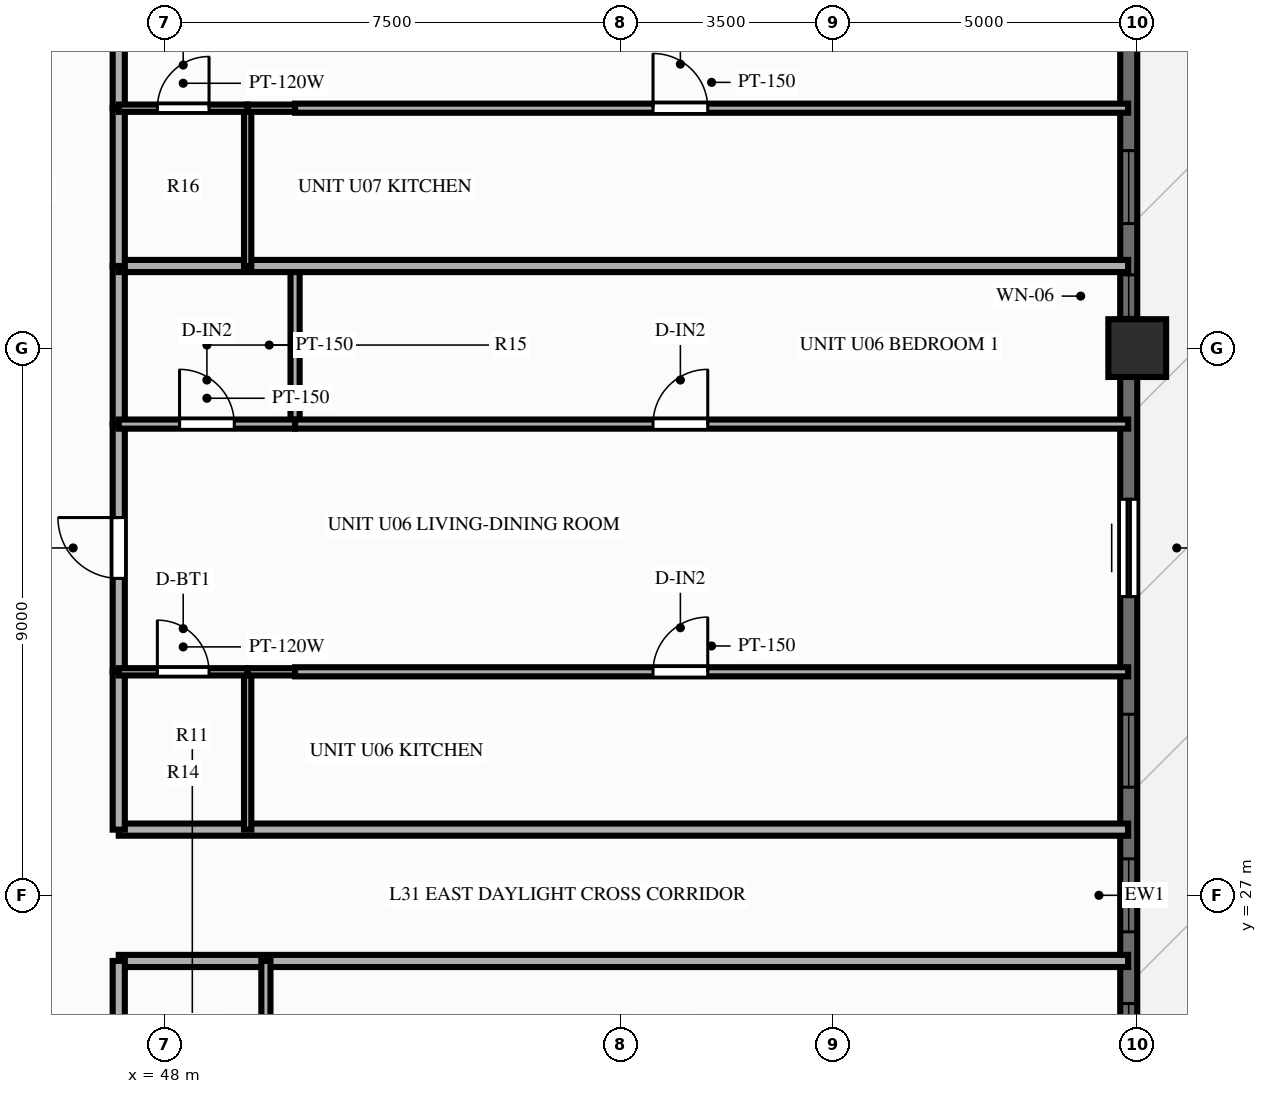
"""IFC4 building model, lengths in metres.
Left out: names, types, materials, properties, quantities, classifications, styles, units other than length and angle.
Written with IfcOpenShell. Run it as: python <this file> out.ifc"""

import sys

from ifc_helpers import new_model, si_unit, direction, frame, frame_2d, origin, origin_2d, place, context, subcontext, project, spatial, rectangle, extrude, source, transform, mapped, element, fill, save


model = new_model("IFC4")
c1 = context("Model", 3, precision=1e-05, world=origin(), true_north=direction((0.0, 1.0)))
c2 = subcontext(c1, "Body", "Model", "MODEL_VIEW")
j1 = project(units=[si_unit("LENGTHUNIT", "METRE"), si_unit("PLANEANGLEUNIT", "RADIAN")], contexts=[c1])
p1 = place(None, origin())
s1 = spatial("IfcSite", under=j1, at=p1, CompositionType="ELEMENT")
p2 = place(p1, origin())
s2 = spatial("IfcBuilding", under=s1, at=p2, CompositionType="ELEMENT")
p3 = place(p2, frame((0.0, 0.0, 98.85)))
s3 = spatial("IfcBuildingStorey", under=s2, at=p3, CompositionType="ELEMENT", Elevation=98.85)
m1 = source(origin(), c2, "Body", "SweptSolid", [
    extrude(rectangle(XDim=0.95, YDim=0.95, at=origin_2d()), origin(), (0.0, 0.0, 1.0), 3.0),
])
p4 = place(p3, frame((64.0, 36.0, 0.0), z_axis=(0.0, 0.0, 1.0), x_axis=(1.0, 0.0, 0.0)))
e1 = element("IfcColumn", 1, at=p4, inside=s3, PredefinedType="COLUMN", context=c2, shape_type="MappedRepresentation", body=[
    mapped(m1, transform((0.0, 0.0, 0.0), scale=1.0)),
])
p5 = place(p3, frame((63.86, 7.2, 0.0), z_axis=(0.0, 0.0, 1.0), x_axis=(0.0, 1.0, 0.0)))
e2 = element("IfcWall", 2, at=p5, inside=s3, PredefinedType="SOLIDWALL", context=c2, shape_type="SweptSolid", body=[
    extrude(rectangle(XDim=39.6, YDim=0.28, at=frame_2d((19.8, 0.0))), origin(), (0.0, 0.0, 1.0), 2.28),
])
p6 = place(p5, frame((0.945, 0.0, 0.25)))
e3 = element("IfcOpeningElement", 3, at=p6, cuts=e2, PredefinedType="OPENING", context=c2, shape_type="SweptSolid", body=[
    extrude(rectangle(XDim=1.2, YDim=1.5, at=frame_2d((0.6, 0.75))), frame((0.0, 0.152, 0.0), z_axis=(0.0, -1.0, 0.0), x_axis=(1.0, 0.0, 0.0)), (0.0, 0.0, 1.0), 0.304),
])
p7 = place(p5, frame((4.213, 0.0, 0.25)))
e4 = element("IfcOpeningElement", 4, at=p7, cuts=e2, PredefinedType="OPENING", context=c2, shape_type="SweptSolid", body=[
    extrude(rectangle(XDim=1.2, YDim=1.5, at=frame_2d((0.6, 0.75))), frame((0.0, 0.152, 0.0), z_axis=(0.0, -1.0, 0.0), x_axis=(1.0, 0.0, 0.0)), (0.0, 0.0, 1.0), 0.304),
])
p8 = place(p5, frame((7.55, 0.0, 0.25)))
e5 = element("IfcOpeningElement", 5, at=p8, cuts=e2, PredefinedType="OPENING", context=c2, shape_type="SweptSolid", body=[
    extrude(rectangle(XDim=1.2, YDim=1.5, at=frame_2d((0.6, 0.75))), frame((0.0, 0.152, 0.0), z_axis=(0.0, -1.0, 0.0), x_axis=(1.0, 0.0, 0.0)), (0.0, 0.0, 1.0), 0.304),
])
p9 = place(p5, frame((13.483, 0.0, 0.25)))
e6 = element("IfcOpeningElement", 6, at=p9, cuts=e2, PredefinedType="OPENING", context=c2, shape_type="SweptSolid", body=[
    extrude(rectangle(XDim=1.2, YDim=1.5, at=frame_2d((0.6, 0.75))), frame((0.0, 0.152, 0.0), z_axis=(0.0, -1.0, 0.0), x_axis=(1.0, 0.0, 0.0)), (0.0, 0.0, 1.0), 0.304),
])
p10 = place(p5, frame((16.82, 0.0, 0.25)))
e7 = element("IfcOpeningElement", 7, at=p10, cuts=e2, PredefinedType="OPENING", context=c2, shape_type="SweptSolid", body=[
    extrude(rectangle(XDim=1.2, YDim=1.5, at=frame_2d((0.6, 0.75))), frame((0.0, 0.152, 0.0), z_axis=(0.0, -1.0, 0.0), x_axis=(1.0, 0.0, 0.0)), (0.0, 0.0, 1.0), 0.304),
])
p11 = place(p5, frame((19.2, 0.0, 0.25)))
e8 = element("IfcOpeningElement", 8, at=p11, cuts=e2, PredefinedType="OPENING", context=c2, shape_type="SweptSolid", body=[
    extrude(rectangle(XDim=1.2, YDim=1.5, at=frame_2d((0.6, 0.75))), frame((0.0, 0.152, 0.0), z_axis=(0.0, -1.0, 0.0), x_axis=(1.0, 0.0, 0.0)), (0.0, 0.0, 1.0), 0.304),
])
p12 = place(p5, frame((21.578, 0.0, 0.25)))
e9 = element("IfcOpeningElement", 9, at=p12, cuts=e2, PredefinedType="OPENING", context=c2, shape_type="SweptSolid", body=[
    extrude(rectangle(XDim=1.2, YDim=1.5, at=frame_2d((0.6, 0.75))), frame((0.0, 0.152, 0.0), z_axis=(0.0, -1.0, 0.0), x_axis=(1.0, 0.0, 0.0)), (0.0, 0.0, 1.0), 0.304),
])
p13 = place(p5, frame((26.313, 0.0, 0.0), z_axis=(0.0, 0.0, 1.0), x_axis=(-1.0, 0.0, 0.0)))
e10 = element("IfcOpeningElement", 10, at=p13, cuts=e2, PredefinedType="OPENING", context=c2, shape_type="SweptSolid", body=[
    extrude(rectangle(XDim=1.6, YDim=2.15, at=frame_2d((0.8, 1.075))), frame((0.0, 0.152, 0.0), z_axis=(0.0, -1.0, 0.0), x_axis=(1.0, 0.0, 0.0)), (0.0, 0.0, 1.0), 0.304),
])
p14 = place(p5, frame((29.305, 0.0, 0.25)))
e11 = element("IfcOpeningElement", 11, at=p14, cuts=e2, PredefinedType="OPENING", context=c2, shape_type="SweptSolid", body=[
    extrude(rectangle(XDim=0.7, YDim=1.5, at=frame_2d((0.35, 0.75))), frame((0.0, 0.152, 0.0), z_axis=(0.0, -1.0, 0.0), x_axis=(1.0, 0.0, 0.0)), (0.0, 0.0, 1.0), 0.304),
])
p15 = place(p5, frame((30.848, 0.0, 0.25)))
e12 = element("IfcOpeningElement", 12, at=p15, cuts=e2, PredefinedType="OPENING", context=c2, shape_type="SweptSolid", body=[
    extrude(rectangle(XDim=1.2, YDim=1.5, at=frame_2d((0.6, 0.75))), frame((0.0, 0.152, 0.0), z_axis=(0.0, -1.0, 0.0), x_axis=(1.0, 0.0, 0.0)), (0.0, 0.0, 1.0), 0.304),
])
p16 = place(p5, frame((34.183, 0.0, 0.25)))
e13 = element("IfcOpeningElement", 13, at=p16, cuts=e2, PredefinedType="OPENING", context=c2, shape_type="SweptSolid", body=[
    extrude(rectangle(XDim=1.2, YDim=1.5, at=frame_2d((0.6, 0.75))), frame((0.0, 0.152, 0.0), z_axis=(0.0, -1.0, 0.0), x_axis=(1.0, 0.0, 0.0)), (0.0, 0.0, 1.0), 0.304),
])
p17 = place(p5, frame((37.452, 0.0, 0.25)))
e14 = element("IfcOpeningElement", 14, at=p17, cuts=e2, PredefinedType="OPENING", context=c2, shape_type="SweptSolid", body=[
    extrude(rectangle(XDim=1.2, YDim=1.5, at=frame_2d((0.6, 0.75))), frame((0.0, 0.152, 0.0), z_axis=(0.0, -1.0, 0.0), x_axis=(1.0, 0.0, 0.0)), (0.0, 0.0, 1.0), 0.304),
])
p18 = place(p3, frame((47.25, 25.92, 0.0), z_axis=(0.0, 0.0, 1.0), x_axis=(1.0, 0.0, 0.0)))
e15 = element("IfcWall", 15, at=p18, inside=s3, PredefinedType="PARTITIONING", context=c2, shape_type="SweptSolid", body=[
    extrude(rectangle(XDim=16.6, YDim=0.2, at=frame_2d((8.3, 0.0))), origin(), (0.0, 0.0, 1.0), 2.79),
])
p19 = place(p3, frame((47.25, 23.32, 0.0), z_axis=(0.0, 0.0, 1.0), x_axis=(0.0, 1.0, 0.0)))
e16 = element("IfcWall", 16, at=p19, inside=s3, PredefinedType="PARTITIONING", context=c2, shape_type="SweptSolid", body=[
    extrude(rectangle(XDim=2.6, YDim=0.2, at=frame_2d((1.3, 0.0))), origin(), (0.0, 0.0, 1.0), 2.79),
])
p20 = place(p3, frame((49.67, 23.32, 0.0), z_axis=(0.0, 0.0, 1.0), x_axis=(0.0, 1.0, 0.0)))
e17 = element("IfcWall", 17, at=p20, inside=s3, PredefinedType="PARTITIONING", context=c2, shape_type="SweptSolid", body=[
    extrude(rectangle(XDim=2.6, YDim=0.15, at=frame_2d((1.3, 0.0))), origin(), (0.0, 0.0, 1.0), 2.79),
])
p21 = place(p3, frame((47.25, 28.08, 0.0), z_axis=(0.0, 0.0, 1.0), x_axis=(1.0, 0.0, 0.0)))
e18 = element("IfcWall", 18, at=p21, inside=s3, PredefinedType="PARTITIONING", context=c2, shape_type="SweptSolid", body=[
    extrude(rectangle(XDim=16.6, YDim=0.2, at=frame_2d((8.3, 0.0))), origin(), (0.0, 0.0, 1.0), 2.79),
])
p22 = place(p3, frame((47.25, 28.08, 0.0), z_axis=(0.0, 0.0, 1.0), x_axis=(0.0, 1.0, 0.0)))
e19 = element("IfcWall", 19, at=p22, inside=s3, PredefinedType="PARTITIONING", context=c2, shape_type="SweptSolid", body=[
    extrude(rectangle(XDim=2.595, YDim=0.2, at=frame_2d((1.298, 0.0))), origin(), (0.0, 0.0, 1.0), 2.79),
])
p23 = place(p3, frame((47.25, 30.676, 0.0), z_axis=(0.0, 0.0, 1.0), x_axis=(0.0, 1.0, 0.0)))
e20 = element("IfcWall", 20, at=p23, inside=s3, PredefinedType="PARTITIONING", context=c2, shape_type="SweptSolid", body=[
    extrude(rectangle(XDim=4.074, YDim=0.2, at=frame_2d((2.037, 0.0))), origin(), (0.0, 0.0, 1.0), 2.79),
])
p24 = place(p23, frame((1.537, 0.0, 0.0)))
e21 = element("IfcOpeningElement", 21, at=p24, cuts=e20, PredefinedType="OPENING", context=c2, shape_type="SweptSolid", body=[
    extrude(rectangle(XDim=1.0, YDim=2.15, at=frame_2d((0.5, 1.075))), frame((0.0, 0.112, 0.0), z_axis=(0.0, -1.0, 0.0), x_axis=(1.0, 0.0, 0.0)), (0.0, 0.0, 1.0), 0.224),
])
p25 = place(p3, frame((47.25, 34.75, 0.0), z_axis=(0.0, 0.0, 1.0), x_axis=(0.0, 1.0, 0.0)))
e22 = element("IfcWall", 22, at=p25, inside=s3, PredefinedType="PARTITIONING", context=c2, shape_type="SweptSolid", body=[
    extrude(rectangle(XDim=2.6, YDim=0.2, at=frame_2d((1.3, 0.0))), origin(), (0.0, 0.0, 1.0), 2.79),
])
p26 = place(p3, frame((49.37, 28.08, 0.0), z_axis=(0.0, 0.0, 1.0), x_axis=(0.0, 1.0, 0.0)))
e23 = element("IfcWall", 23, at=p26, inside=s3, PredefinedType="PARTITIONING", context=c2, shape_type="SweptSolid", body=[
    extrude(rectangle(XDim=2.595, YDim=0.12, at=frame_2d((1.298, 0.0))), origin(), (0.0, 0.0, 1.0), 2.79),
])
p27 = place(p3, frame((50.15, 34.75, 0.0), z_axis=(0.0, 0.0, 1.0), x_axis=(0.0, 1.0, 0.0)))
e24 = element("IfcWall", 24, at=p27, inside=s3, PredefinedType="PARTITIONING", context=c2, shape_type="SweptSolid", body=[
    extrude(rectangle(XDim=2.6, YDim=0.15, at=frame_2d((1.3, 0.0))), origin(), (0.0, 0.0, 1.0), 2.79),
])
p28 = place(p3, frame((47.25, 30.676, 0.0), z_axis=(0.0, 0.0, 1.0), x_axis=(1.0, 0.0, 0.0)))
e25 = element("IfcWall", 25, at=p28, inside=s3, PredefinedType="PARTITIONING", context=c2, shape_type="SweptSolid", body=[
    extrude(rectangle(XDim=2.12, YDim=0.12, at=frame_2d((1.06, 0.0))), origin(), (0.0, 0.0, 1.0), 2.79),
])
p29 = place(p28, frame((0.635, 0.0, 0.0)))
e26 = element("IfcOpeningElement", 26, at=p29, cuts=e25, PredefinedType="OPENING", context=c2, shape_type="SweptSolid", body=[
    extrude(rectangle(XDim=0.85, YDim=2.05, at=frame_2d((0.425, 1.025))), frame((0.0, 0.072, 0.0), z_axis=(0.0, -1.0, 0.0), x_axis=(1.0, 0.0, 0.0)), (0.0, 0.0, 1.0), 0.144),
])
p30 = place(p3, frame((49.37, 30.676, 0.0), z_axis=(0.0, 0.0, 1.0), x_axis=(1.0, 0.0, 0.0)))
e27 = element("IfcWall", 27, at=p30, inside=s3, PredefinedType="PARTITIONING", context=c2, shape_type="SweptSolid", body=[
    extrude(rectangle(XDim=0.78, YDim=0.12, at=frame_2d((0.39, 0.0))), origin(), (0.0, 0.0, 1.0), 2.79),
])
p31 = place(p3, frame((50.15, 30.676, 0.0), z_axis=(0.0, 0.0, 1.0), x_axis=(1.0, 0.0, 0.0)))
e28 = element("IfcWall", 28, at=p31, inside=s3, PredefinedType="PARTITIONING", context=c2, shape_type="SweptSolid", body=[
    extrude(rectangle(XDim=13.7, YDim=0.15, at=frame_2d((6.85, 0.0))), origin(), (0.0, 0.0, 1.0), 2.79),
])
p32 = place(p31, frame((5.887, 0.0, 0.0)))
e29 = element("IfcOpeningElement", 29, at=p32, cuts=e28, PredefinedType="OPENING", context=c2, shape_type="SweptSolid", body=[
    extrude(rectangle(XDim=0.9, YDim=2.1, at=frame_2d((0.45, 1.05))), frame((0.0, 0.087, 0.0), z_axis=(0.0, -1.0, 0.0), x_axis=(1.0, 0.0, 0.0)), (0.0, 0.0, 1.0), 0.174),
])
p33 = place(p3, frame((47.25, 34.75, 0.0), z_axis=(0.0, 0.0, 1.0), x_axis=(1.0, 0.0, 0.0)))
e30 = element("IfcWall", 30, at=p33, inside=s3, PredefinedType="PARTITIONING", context=c2, shape_type="SweptSolid", body=[
    extrude(rectangle(XDim=2.9, YDim=0.15, at=frame_2d((1.45, 0.0))), origin(), (0.0, 0.0, 1.0), 2.79),
])
p34 = place(p33, frame((1.0, 0.0, 0.0)))
e31 = element("IfcOpeningElement", 31, at=p34, cuts=e30, PredefinedType="OPENING", context=c2, shape_type="SweptSolid", body=[
    extrude(rectangle(XDim=0.9, YDim=2.1, at=frame_2d((0.45, 1.05))), frame((0.0, 0.087, 0.0), z_axis=(0.0, -1.0, 0.0), x_axis=(1.0, 0.0, 0.0)), (0.0, 0.0, 1.0), 0.174),
])
p35 = place(p3, frame((50.15, 34.75, 0.0), z_axis=(0.0, 0.0, 1.0), x_axis=(1.0, 0.0, 0.0)))
e32 = element("IfcWall", 32, at=p35, inside=s3, PredefinedType="PARTITIONING", context=c2, shape_type="SweptSolid", body=[
    extrude(rectangle(XDim=13.7, YDim=0.15, at=frame_2d((6.85, 0.0))), origin(), (0.0, 0.0, 1.0), 2.79),
])
p36 = place(p35, frame((5.887, 0.0, 0.0)))
e33 = element("IfcOpeningElement", 33, at=p36, cuts=e32, PredefinedType="OPENING", context=c2, shape_type="SweptSolid", body=[
    extrude(rectangle(XDim=0.9, YDim=2.1, at=frame_2d((0.45, 1.05))), frame((0.0, 0.087, 0.0), z_axis=(0.0, -1.0, 0.0), x_axis=(1.0, 0.0, 0.0)), (0.0, 0.0, 1.0), 0.174),
])
p37 = place(p3, frame((47.25, 37.35, 0.0), z_axis=(0.0, 0.0, 1.0), x_axis=(1.0, 0.0, 0.0)))
e34 = element("IfcWall", 34, at=p37, inside=s3, PredefinedType="PARTITIONING", context=c2, shape_type="SweptSolid", body=[
    extrude(rectangle(XDim=16.6, YDim=0.2, at=frame_2d((8.3, 0.0))), origin(), (0.0, 0.0, 1.0), 2.79),
])
p38 = place(p3, frame((47.25, 37.35, 0.0), z_axis=(0.0, 0.0, 1.0), x_axis=(0.0, 1.0, 0.0)))
e35 = element("IfcWall", 35, at=p38, inside=s3, PredefinedType="PARTITIONING", context=c2, shape_type="SweptSolid", body=[
    extrude(rectangle(XDim=2.595, YDim=0.2, at=frame_2d((1.298, 0.0))), origin(), (0.0, 0.0, 1.0), 2.79),
])
p39 = place(p3, frame((47.25, 39.946, 0.0), z_axis=(0.0, 0.0, 1.0), x_axis=(0.0, 1.0, 0.0)))
e36 = element("IfcWall", 36, at=p39, inside=s3, PredefinedType="PARTITIONING", context=c2, shape_type="SweptSolid", body=[
    extrude(rectangle(XDim=4.074, YDim=0.2, at=frame_2d((2.037, 0.0))), origin(), (0.0, 0.0, 1.0), 2.79),
])
p40 = place(p39, frame((1.537, 0.0, 0.0)))
e37 = element("IfcOpeningElement", 37, at=p40, cuts=e36, PredefinedType="OPENING", context=c2, shape_type="SweptSolid", body=[
    extrude(rectangle(XDim=1.0, YDim=2.15, at=frame_2d((0.5, 1.075))), frame((0.0, 0.112, 0.0), z_axis=(0.0, -1.0, 0.0), x_axis=(1.0, 0.0, 0.0)), (0.0, 0.0, 1.0), 0.224),
])
p41 = place(p3, frame((49.37, 37.35, 0.0), z_axis=(0.0, 0.0, 1.0), x_axis=(0.0, 1.0, 0.0)))
e38 = element("IfcWall", 38, at=p41, inside=s3, PredefinedType="PARTITIONING", context=c2, shape_type="SweptSolid", body=[
    extrude(rectangle(XDim=2.595, YDim=0.12, at=frame_2d((1.298, 0.0))), origin(), (0.0, 0.0, 1.0), 2.79),
])
p42 = place(p3, frame((47.25, 39.946, 0.0), z_axis=(0.0, 0.0, 1.0), x_axis=(1.0, 0.0, 0.0)))
e39 = element("IfcWall", 39, at=p42, inside=s3, PredefinedType="PARTITIONING", context=c2, shape_type="SweptSolid", body=[
    extrude(rectangle(XDim=2.12, YDim=0.12, at=frame_2d((1.06, 0.0))), origin(), (0.0, 0.0, 1.0), 2.79),
])
p43 = place(p42, frame((0.635, 0.0, 0.0)))
e40 = element("IfcOpeningElement", 40, at=p43, cuts=e39, PredefinedType="OPENING", context=c2, shape_type="SweptSolid", body=[
    extrude(rectangle(XDim=0.85, YDim=2.05, at=frame_2d((0.425, 1.025))), frame((0.0, 0.072, 0.0), z_axis=(0.0, -1.0, 0.0), x_axis=(1.0, 0.0, 0.0)), (0.0, 0.0, 1.0), 0.144),
])
p44 = place(p3, frame((49.37, 39.946, 0.0), z_axis=(0.0, 0.0, 1.0), x_axis=(1.0, 0.0, 0.0)))
e41 = element("IfcWall", 41, at=p44, inside=s3, PredefinedType="PARTITIONING", context=c2, shape_type="SweptSolid", body=[
    extrude(rectangle(XDim=0.78, YDim=0.12, at=frame_2d((0.39, 0.0))), origin(), (0.0, 0.0, 1.0), 2.79),
])
p45 = place(p3, frame((50.15, 39.946, 0.0), z_axis=(0.0, 0.0, 1.0), x_axis=(1.0, 0.0, 0.0)))
e42 = element("IfcWall", 42, at=p45, inside=s3, PredefinedType="PARTITIONING", context=c2, shape_type="SweptSolid", body=[
    extrude(rectangle(XDim=13.7, YDim=0.15, at=frame_2d((6.85, 0.0))), origin(), (0.0, 0.0, 1.0), 2.79),
])
p46 = place(p45, frame((5.887, 0.0, 0.0)))
e43 = element("IfcOpeningElement", 43, at=p46, cuts=e42, PredefinedType="OPENING", context=c2, shape_type="SweptSolid", body=[
    extrude(rectangle(XDim=0.9, YDim=2.1, at=frame_2d((0.45, 1.05))), frame((0.0, 0.087, 0.0), z_axis=(0.0, -1.0, 0.0), x_axis=(1.0, 0.0, 0.0)), (0.0, 0.0, 1.0), 0.174),
])
m2 = source(origin(), c2, "Body", "SweptSolid", [
    extrude(rectangle(XDim=1.2, YDim=1.5, at=frame_2d((0.6, 0.75))), frame((0.0, 0.03, 0.0), z_axis=(0.0, -1.0, 0.0), x_axis=(1.0, 0.0, 0.0)), (0.0, 0.0, 1.0), 0.06),
])
p47 = place(p10, origin())
e44 = element("IfcWindow", 44, at=p47, inside=s3, PartitioningType="SINGLE_PANEL", PredefinedType="WINDOW", context=c2, shape_type="MappedRepresentation", body=[
    mapped(m2, transform((0.0, 0.0, 0.0), scale=1.0)),
])
fill(e7, e44)
p48 = place(p11, origin())
e45 = element("IfcWindow", 45, at=p48, inside=s3, PartitioningType="SINGLE_PANEL", PredefinedType="WINDOW", context=c2, shape_type="MappedRepresentation", body=[
    mapped(m2, transform((0.0, 0.0, 0.0), scale=1.0)),
])
fill(e8, e45)
p49 = place(p12, origin())
e46 = element("IfcWindow", 46, at=p49, inside=s3, PartitioningType="SINGLE_PANEL", PredefinedType="WINDOW", context=c2, shape_type="MappedRepresentation", body=[
    mapped(m2, transform((0.0, 0.0, 0.0), scale=1.0)),
])
fill(e9, e46)
m3 = source(origin(), c2, "Body", "SweptSolid", [
    extrude(rectangle(XDim=1.6, YDim=2.15, at=frame_2d((0.8, 1.075))), frame((0.0, 0.025, 0.0), z_axis=(0.0, -1.0, 0.0), x_axis=(1.0, 0.0, 0.0)), (0.0, 0.0, 1.0), 0.05),
])
p50 = place(p13, origin())
e47 = element("IfcDoor", 47, at=p50, inside=s3, OperationType="SLIDING_TO_LEFT", PredefinedType="DOOR", context=c2, shape_type="MappedRepresentation", body=[
    mapped(m3, transform((0.0, 0.0, 0.0), scale=1.0)),
])
fill(e10, e47)
m4 = source(origin(), c2, "Body", "SweptSolid", [
    extrude(rectangle(XDim=0.7, YDim=1.5, at=frame_2d((0.35, 0.75))), frame((0.0, 0.03, 0.0), z_axis=(0.0, -1.0, 0.0), x_axis=(1.0, 0.0, 0.0)), (0.0, 0.0, 1.0), 0.06),
])
p51 = place(p14, origin())
e48 = element("IfcWindow", 48, at=p51, inside=s3, PartitioningType="SINGLE_PANEL", PredefinedType="WINDOW", context=c2, shape_type="MappedRepresentation", body=[
    mapped(m4, transform((0.0, 0.0, 0.0), scale=1.0)),
])
fill(e11, e48)
p52 = place(p15, origin())
e49 = element("IfcWindow", 49, at=p52, inside=s3, PartitioningType="SINGLE_PANEL", PredefinedType="WINDOW", context=c2, shape_type="MappedRepresentation", body=[
    mapped(m2, transform((0.0, 0.0, 0.0), scale=1.0)),
])
fill(e12, e49)
m5 = source(origin(), c2, "Body", "SweptSolid", [
    extrude(rectangle(XDim=1.0, YDim=2.15, at=frame_2d((0.5, 1.075))), frame((0.0, 0.025, 0.0), z_axis=(0.0, -1.0, 0.0), x_axis=(1.0, 0.0, 0.0)), (0.0, 0.0, 1.0), 0.05),
])
p53 = place(p24, origin())
e50 = element("IfcDoor", 50, at=p53, inside=s3, OperationType="SINGLE_SWING_RIGHT", PredefinedType="DOOR", context=c2, shape_type="MappedRepresentation", body=[
    mapped(m5, transform((0.0, 0.0, 0.0), scale=1.0)),
])
fill(e21, e50)
m6 = source(origin(), c2, "Body", "SweptSolid", [
    extrude(rectangle(XDim=0.85, YDim=2.05, at=frame_2d((0.425, 1.025))), frame((0.0, 0.025, 0.0), z_axis=(0.0, -1.0, 0.0), x_axis=(1.0, 0.0, 0.0)), (0.0, 0.0, 1.0), 0.05),
])
p54 = place(p29, origin())
e51 = element("IfcDoor", 51, at=p54, inside=s3, OperationType="SINGLE_SWING_LEFT", PredefinedType="DOOR", context=c2, shape_type="MappedRepresentation", body=[
    mapped(m6, transform((0.0, 0.0, 0.0), scale=1.0)),
])
fill(e26, e51)
m7 = source(origin(), c2, "Body", "SweptSolid", [
    extrude(rectangle(XDim=0.9, YDim=2.1, at=frame_2d((0.45, 1.05))), frame((0.0, 0.025, 0.0), z_axis=(0.0, -1.0, 0.0), x_axis=(1.0, 0.0, 0.0)), (0.0, 0.0, 1.0), 0.05),
])
p55 = place(p32, origin())
e52 = element("IfcDoor", 52, at=p55, inside=s3, OperationType="SINGLE_SWING_RIGHT", PredefinedType="DOOR", context=c2, shape_type="MappedRepresentation", body=[
    mapped(m7, transform((0.0, 0.0, 0.0), scale=1.0)),
])
fill(e29, e52)
p56 = place(p34, origin())
e53 = element("IfcDoor", 53, at=p56, inside=s3, OperationType="SINGLE_SWING_LEFT", PredefinedType="DOOR", context=c2, shape_type="MappedRepresentation", body=[
    mapped(m7, transform((0.0, 0.0, 0.0), scale=1.0)),
])
fill(e31, e53)
p57 = place(p36, origin())
e54 = element("IfcDoor", 54, at=p57, inside=s3, OperationType="SINGLE_SWING_RIGHT", PredefinedType="DOOR", context=c2, shape_type="MappedRepresentation", body=[
    mapped(m7, transform((0.0, 0.0, 0.0), scale=1.0)),
])
fill(e33, e54)
p58 = place(p43, origin())
e55 = element("IfcDoor", 55, at=p58, inside=s3, OperationType="SINGLE_SWING_RIGHT", PredefinedType="DOOR", context=c2, shape_type="MappedRepresentation", body=[
    mapped(m6, transform((0.0, 0.0, 0.0), scale=1.0)),
])
fill(e40, e55)
p59 = place(p46, origin())
e56 = element("IfcDoor", 56, at=p59, inside=s3, OperationType="SINGLE_SWING_LEFT", PredefinedType="DOOR", context=c2, shape_type="MappedRepresentation", body=[
    mapped(m7, transform((0.0, 0.0, 0.0), scale=1.0)),
])
fill(e43, e56)
save(model, sys.argv[1])
